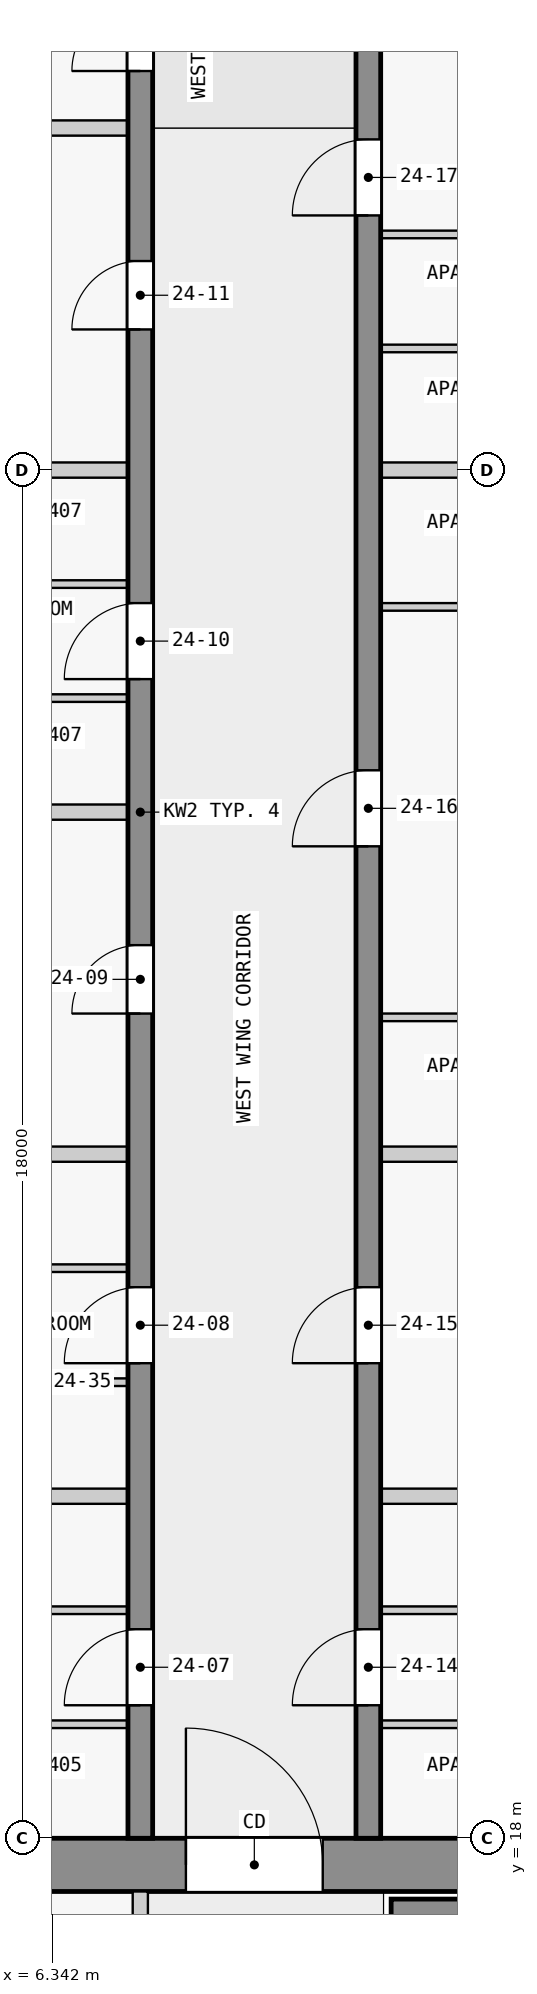
"""IFC4 building model, lengths in metres.
Left out: names, types, materials, properties, quantities, classifications, styles, units other than length and angle.
Written with IfcOpenShell. Run it as: python <this file> out.ifc"""

import sys

from ifc_helpers import new_model, si_unit, direction, frame, frame_2d, origin, place, context, subcontext, project, spatial, rectangle, extrude, element, fill, save


model = new_model("IFC4")
c1 = context("Model", 3, precision=1e-05, world=origin(), true_north=direction((0.0, 1.0)))
c2 = subcontext(c1, "Body", "Model", "MODEL_VIEW")
j1 = project(units=[si_unit("LENGTHUNIT", "METRE"), si_unit("PLANEANGLEUNIT", "RADIAN")], contexts=[c1])
p1 = place(None, origin())
s1 = spatial("IfcSite", under=j1, at=p1, CompositionType="ELEMENT")
p2 = place(p1, origin())
s2 = spatial("IfcBuilding", under=s1, at=p2, CompositionType="ELEMENT")
p3 = place(p2, frame((0.0, 0.0, 95.8)))
s3 = spatial("IfcBuildingStorey", under=s2, at=p3, CompositionType="ELEMENT", Elevation=95.8)
p4 = place(p3, frame((1.6, 17.65, 0.0), z_axis=(0.0, 0.0, 1.0), x_axis=(1.0, 0.0, 0.0)))
e1 = element("IfcWall", 1, at=p4, inside=s3, PredefinedType="SHEAR", context=c2, shape_type="SweptSolid", body=[
    extrude(rectangle(XDim=20.9, YDim=0.7, at=frame_2d((10.45, 0.0))), origin(), (0.0, 0.0, 1.0), 3.25),
])
p5 = place(p4, frame((6.5, 0.0, 0.0)))
e2 = element("IfcOpeningElement", 2, at=p5, cuts=e1, PredefinedType="OPENING", context=c2, shape_type="SweptSolid", body=[
    extrude(rectangle(XDim=1.8, YDim=2.1, at=frame_2d((0.9, 1.05))), frame((0.0, 0.36, 0.0), z_axis=(0.0, -1.0, 0.0), x_axis=(1.0, 0.0, 0.0)), (0.0, 0.0, 1.0), 0.72),
])
p6 = place(p3, frame((10.8, 17.05, 0.0), z_axis=(0.0, 0.0, 1.0), x_axis=(1.0, 0.0, 0.0)))
e3 = element("IfcWall", 3, at=p6, inside=s3, PredefinedType="SHEAR", context=c2, shape_type="SweptSolid", body=[
    extrude(rectangle(XDim=7.8, YDim=0.3, at=frame_2d((3.9, 0.0))), origin(), (0.0, 0.0, 1.0), 3.25),
])
p7 = place(p3, frame((7.5, 18.0, 0.0), z_axis=(0.0, 0.0, 1.0), x_axis=(0.0, 1.0, 0.0)))
e4 = element("IfcWall", 4, at=p7, inside=s3, PredefinedType="SHEAR", context=c2, shape_type="SweptSolid", body=[
    extrude(rectangle(XDim=27.0, YDim=0.325, at=frame_2d((13.5, 0.0))), origin(), (0.0, 0.0, 1.0), 3.25),
])
p8 = place(p7, frame((1.75, 0.0, 0.0)))
e5 = element("IfcOpeningElement", 5, at=p8, cuts=e4, PredefinedType="OPENING", context=c2, shape_type="SweptSolid", body=[
    extrude(rectangle(XDim=1.0, YDim=2.1, at=frame_2d((0.5, 1.05))), frame((0.0, 0.172, 0.0), z_axis=(0.0, -1.0, 0.0), x_axis=(1.0, 0.0, 0.0)), (0.0, 0.0, 1.0), 0.345),
])
p9 = place(p7, frame((6.25, 0.0, 0.0)))
e6 = element("IfcOpeningElement", 6, at=p9, cuts=e4, PredefinedType="OPENING", context=c2, shape_type="SweptSolid", body=[
    extrude(rectangle(XDim=1.0, YDim=2.1, at=frame_2d((0.5, 1.05))), frame((0.0, 0.172, 0.0), z_axis=(0.0, -1.0, 0.0), x_axis=(1.0, 0.0, 0.0)), (0.0, 0.0, 1.0), 0.345),
])
p10 = place(p7, frame((10.85, 0.0, 0.0)))
e7 = element("IfcOpeningElement", 7, at=p10, cuts=e4, PredefinedType="OPENING", context=c2, shape_type="SweptSolid", body=[
    extrude(rectangle(XDim=0.9, YDim=2.1, at=frame_2d((0.45, 1.05))), frame((0.0, 0.172, 0.0), z_axis=(0.0, -1.0, 0.0), x_axis=(1.0, 0.0, 0.0)), (0.0, 0.0, 1.0), 0.345),
])
p11 = place(p7, frame((15.25, 0.0, 0.0)))
e8 = element("IfcOpeningElement", 8, at=p11, cuts=e4, PredefinedType="OPENING", context=c2, shape_type="SweptSolid", body=[
    extrude(rectangle(XDim=1.0, YDim=2.1, at=frame_2d((0.5, 1.05))), frame((0.0, 0.172, 0.0), z_axis=(0.0, -1.0, 0.0), x_axis=(1.0, 0.0, 0.0)), (0.0, 0.0, 1.0), 0.345),
])
p12 = place(p7, frame((19.85, 0.0, 0.0)))
e9 = element("IfcOpeningElement", 9, at=p12, cuts=e4, PredefinedType="OPENING", context=c2, shape_type="SweptSolid", body=[
    extrude(rectangle(XDim=0.9, YDim=2.1, at=frame_2d((0.45, 1.05))), frame((0.0, 0.172, 0.0), z_axis=(0.0, -1.0, 0.0), x_axis=(1.0, 0.0, 0.0)), (0.0, 0.0, 1.0), 0.345),
])
p13 = place(p7, frame((23.25, 0.0, 0.0)))
e10 = element("IfcOpeningElement", 10, at=p13, cuts=e4, PredefinedType="OPENING", context=c2, shape_type="SweptSolid", body=[
    extrude(rectangle(XDim=0.9, YDim=2.1, at=frame_2d((0.45, 1.05))), frame((0.0, 0.172, 0.0), z_axis=(0.0, -1.0, 0.0), x_axis=(1.0, 0.0, 0.0)), (0.0, 0.0, 1.0), 0.345),
])
p14 = place(p7, frame((25.45, 0.0, 0.0)))
e11 = element("IfcOpeningElement", 11, at=p14, cuts=e4, PredefinedType="OPENING", context=c2, shape_type="SweptSolid", body=[
    extrude(rectangle(XDim=1.0, YDim=2.1, at=frame_2d((0.5, 1.05))), frame((0.0, 0.172, 0.0), z_axis=(0.0, -1.0, 0.0), x_axis=(1.0, 0.0, 0.0)), (0.0, 0.0, 1.0), 0.345),
])
p15 = place(p3, frame((10.5, 18.0, 0.0), z_axis=(0.0, 0.0, 1.0), x_axis=(0.0, 1.0, 0.0)))
e12 = element("IfcWall", 12, at=p15, inside=s3, PredefinedType="SHEAR", context=c2, shape_type="SweptSolid", body=[
    extrude(rectangle(XDim=27.0, YDim=0.325, at=frame_2d((13.5, 0.0))), origin(), (0.0, 0.0, 1.0), 3.25),
])
p16 = place(p15, frame((1.75, 0.0, 0.0)))
e13 = element("IfcOpeningElement", 13, at=p16, cuts=e12, PredefinedType="OPENING", context=c2, shape_type="SweptSolid", body=[
    extrude(rectangle(XDim=1.0, YDim=2.1, at=frame_2d((0.5, 1.05))), frame((0.0, 0.172, 0.0), z_axis=(0.0, -1.0, 0.0), x_axis=(1.0, 0.0, 0.0)), (0.0, 0.0, 1.0), 0.345),
])
p17 = place(p15, frame((6.25, 0.0, 0.0)))
e14 = element("IfcOpeningElement", 14, at=p17, cuts=e12, PredefinedType="OPENING", context=c2, shape_type="SweptSolid", body=[
    extrude(rectangle(XDim=1.0, YDim=2.1, at=frame_2d((0.5, 1.05))), frame((0.0, 0.172, 0.0), z_axis=(0.0, -1.0, 0.0), x_axis=(1.0, 0.0, 0.0)), (0.0, 0.0, 1.0), 0.345),
])
p18 = place(p15, frame((13.05, 0.0, 0.0)))
e15 = element("IfcOpeningElement", 15, at=p18, cuts=e12, PredefinedType="OPENING", context=c2, shape_type="SweptSolid", body=[
    extrude(rectangle(XDim=1.0, YDim=2.1, at=frame_2d((0.5, 1.05))), frame((0.0, 0.172, 0.0), z_axis=(0.0, -1.0, 0.0), x_axis=(1.0, 0.0, 0.0)), (0.0, 0.0, 1.0), 0.345),
])
p19 = place(p15, frame((21.35, 0.0, 0.0)))
e16 = element("IfcOpeningElement", 16, at=p19, cuts=e12, PredefinedType="OPENING", context=c2, shape_type="SweptSolid", body=[
    extrude(rectangle(XDim=1.0, YDim=2.1, at=frame_2d((0.5, 1.05))), frame((0.0, 0.172, 0.0), z_axis=(0.0, -1.0, 0.0), x_axis=(1.0, 0.0, 0.0)), (0.0, 0.0, 1.0), 0.345),
])
p20 = place(p3, frame((7.5, 10.1, 0.0), z_axis=(0.0, 0.0, 1.0), x_axis=(0.0, 1.0, 0.0)))
e17 = element("IfcWall", 17, at=p20, inside=s3, PredefinedType="PARTITIONING", context=c2, shape_type="SweptSolid", body=[
    extrude(rectangle(XDim=7.2, YDim=0.2, at=frame_2d((3.6, 0.0))), origin(), (0.0, 0.0, 1.0), 3.25),
])
p21 = place(p20, frame((1.05, 0.0, 0.0)))
e18 = element("IfcOpeningElement", 18, at=p21, cuts=e17, PredefinedType="OPENING", context=c2, shape_type="SweptSolid", body=[
    extrude(rectangle(XDim=0.9, YDim=2.1, at=frame_2d((0.45, 1.05))), frame((0.0, 0.11, 0.0), z_axis=(0.0, -1.0, 0.0), x_axis=(1.0, 0.0, 0.0)), (0.0, 0.0, 1.0), 0.22),
])
p22 = place(p20, frame((4.65, 0.0, 0.0)))
e19 = element("IfcOpeningElement", 19, at=p22, cuts=e17, PredefinedType="OPENING", context=c2, shape_type="SweptSolid", body=[
    extrude(rectangle(XDim=0.9, YDim=2.1, at=frame_2d((0.45, 1.05))), frame((0.0, 0.11, 0.0), z_axis=(0.0, -1.0, 0.0), x_axis=(1.0, 0.0, 0.0)), (0.0, 0.0, 1.0), 0.22),
])
p23 = place(p3, frame((7.337, 19.5, 0.0), z_axis=(0.0, 0.0, 1.0), x_axis=(-1.0, 0.0, 0.0)))
e20 = element("IfcWall", 20, at=p23, inside=s3, PredefinedType="PARTITIONING", context=c2, shape_type="SweptSolid", body=[
    extrude(rectangle(XDim=3.4, YDim=0.1, at=frame_2d((1.7, 0.0))), origin(), (0.0, 0.0, 1.0), 3.25),
])
p24 = place(p23, frame((1.25, 0.0, 0.0)))
e21 = element("IfcOpeningElement", 21, at=p24, cuts=e20, PredefinedType="OPENING", context=c2, shape_type="SweptSolid", body=[
    extrude(rectangle(XDim=0.9, YDim=2.1, at=frame_2d((0.45, 1.05))), frame((0.0, 0.06, 0.0), z_axis=(0.0, -1.0, 0.0), x_axis=(1.0, 0.0, 0.0)), (0.0, 0.0, 1.0), 0.12),
])
p25 = place(p3, frame((14.062, 19.5, 0.0), z_axis=(0.0, 0.0, 1.0), x_axis=(-1.0, 0.0, 0.0)))
e22 = element("IfcWall", 22, at=p25, inside=s3, PredefinedType="PARTITIONING", context=c2, shape_type="SweptSolid", body=[
    extrude(rectangle(XDim=3.4, YDim=0.1, at=frame_2d((1.7, 0.0))), origin(), (0.0, 0.0, 1.0), 3.25),
])
p26 = place(p25, frame((1.25, 0.0, 0.0)))
e23 = element("IfcOpeningElement", 23, at=p26, cuts=e22, PredefinedType="OPENING", context=c2, shape_type="SweptSolid", body=[
    extrude(rectangle(XDim=0.9, YDim=2.1, at=frame_2d((0.45, 1.05))), frame((0.0, 0.06, 0.0), z_axis=(0.0, -1.0, 0.0), x_axis=(1.0, 0.0, 0.0)), (0.0, 0.0, 1.0), 0.12),
])
p27 = place(p3, frame((3.938, 21.0, 0.0), z_axis=(0.0, 0.0, 1.0), x_axis=(1.0, 0.0, 0.0)))
e24 = element("IfcWall", 24, at=p27, inside=s3, PredefinedType="PARTITIONING", context=c2, shape_type="SweptSolid", body=[
    extrude(rectangle(XDim=3.4, YDim=0.1, at=frame_2d((1.7, 0.0))), origin(), (0.0, 0.0, 1.0), 3.25),
])
p28 = place(p27, frame((1.25, 0.0, 0.0)))
e25 = element("IfcOpeningElement", 25, at=p28, cuts=e24, PredefinedType="OPENING", context=c2, shape_type="SweptSolid", body=[
    extrude(rectangle(XDim=0.9, YDim=2.1, at=frame_2d((0.45, 1.05))), frame((0.0, 0.06, 0.0), z_axis=(0.0, -1.0, 0.0), x_axis=(1.0, 0.0, 0.0)), (0.0, 0.0, 1.0), 0.12),
])
p29 = place(p3, frame((10.663, 21.0, 0.0), z_axis=(0.0, 0.0, 1.0), x_axis=(1.0, 0.0, 0.0)))
e26 = element("IfcWall", 26, at=p29, inside=s3, PredefinedType="PARTITIONING", context=c2, shape_type="SweptSolid", body=[
    extrude(rectangle(XDim=3.4, YDim=0.1, at=frame_2d((1.7, 0.0))), origin(), (0.0, 0.0, 1.0), 3.25),
])
p30 = place(p29, frame((1.25, 0.0, 0.0)))
e27 = element("IfcOpeningElement", 27, at=p30, cuts=e26, PredefinedType="OPENING", context=c2, shape_type="SweptSolid", body=[
    extrude(rectangle(XDim=0.9, YDim=2.1, at=frame_2d((0.45, 1.05))), frame((0.0, 0.06, 0.0), z_axis=(0.0, -1.0, 0.0), x_axis=(1.0, 0.0, 0.0)), (0.0, 0.0, 1.0), 0.12),
])
for number, where, z_axis, x_axis in (
    (28, (7.337, 22.5, 0.0), (0.0, 0.0, 1.0), (-1.0, 0.0, 0.0)),
    (29, (13.962, 22.5, 0.0), (0.0, 0.0, 1.0), (-1.0, 0.0, 0.0)),
):
    element("IfcWall", number, at=place(p3, frame(where, z_axis=z_axis, x_axis=x_axis)), inside=s3, PredefinedType="PARTITIONING", context=c2, shape_type="SweptSolid", body=[
        extrude(rectangle(XDim=3.3, YDim=0.2, at=frame_2d((1.65, 0.0))), origin(), (0.0, 0.0, 1.0), 3.25),
    ])
p31 = place(p3, frame((7.337, 24.0, 0.0), z_axis=(0.0, 0.0, 1.0), x_axis=(-1.0, 0.0, 0.0)))
e30 = element("IfcWall", 30, at=p31, inside=s3, PredefinedType="PARTITIONING", context=c2, shape_type="SweptSolid", body=[
    extrude(rectangle(XDim=3.4, YDim=0.1, at=frame_2d((1.7, 0.0))), origin(), (0.0, 0.0, 1.0), 3.25),
])
p32 = place(p31, frame((1.25, 0.0, 0.0)))
e31 = element("IfcOpeningElement", 31, at=p32, cuts=e30, PredefinedType="OPENING", context=c2, shape_type="SweptSolid", body=[
    extrude(rectangle(XDim=0.9, YDim=2.1, at=frame_2d((0.45, 1.05))), frame((0.0, 0.06, 0.0), z_axis=(0.0, -1.0, 0.0), x_axis=(1.0, 0.0, 0.0)), (0.0, 0.0, 1.0), 0.12),
])
p33 = place(p3, frame((3.938, 25.5, 0.0), z_axis=(0.0, 0.0, 1.0), x_axis=(1.0, 0.0, 0.0)))
e32 = element("IfcWall", 32, at=p33, inside=s3, PredefinedType="PARTITIONING", context=c2, shape_type="SweptSolid", body=[
    extrude(rectangle(XDim=3.4, YDim=0.1, at=frame_2d((1.7, 0.0))), origin(), (0.0, 0.0, 1.0), 3.25),
])
p34 = place(p33, frame((1.25, 0.0, 0.0)))
e33 = element("IfcOpeningElement", 33, at=p34, cuts=e32, PredefinedType="OPENING", context=c2, shape_type="SweptSolid", body=[
    extrude(rectangle(XDim=0.9, YDim=2.1, at=frame_2d((0.45, 1.05))), frame((0.0, 0.06, 0.0), z_axis=(0.0, -1.0, 0.0), x_axis=(1.0, 0.0, 0.0)), (0.0, 0.0, 1.0), 0.12),
])
p35 = place(p3, frame((7.337, 27.0, 0.0), z_axis=(0.0, 0.0, 1.0), x_axis=(-1.0, 0.0, 0.0)))
e34 = element("IfcWall", 34, at=p35, inside=s3, PredefinedType="PARTITIONING", context=c2, shape_type="SweptSolid", body=[
    extrude(rectangle(XDim=3.3, YDim=0.2, at=frame_2d((1.65, 0.0))), origin(), (0.0, 0.0, 1.0), 3.25),
])
p36 = place(p3, frame((18.08, 27.0, 0.0), z_axis=(0.0, 0.0, 1.0), x_axis=(-1.0, 0.0, 0.0)))
e35 = element("IfcWall", 35, at=p36, inside=s3, PredefinedType="PARTITIONING", context=c2, shape_type="SweptSolid", body=[
    extrude(rectangle(XDim=7.417, YDim=0.2, at=frame_2d((3.709, 0.0))), origin(), (0.0, 0.0, 1.0), 3.25),
])
p37 = place(p3, frame((14.062, 28.8, 0.0), z_axis=(0.0, 0.0, 1.0), x_axis=(-1.0, 0.0, 0.0)))
e36 = element("IfcWall", 36, at=p37, inside=s3, PredefinedType="PARTITIONING", context=c2, shape_type="SweptSolid", body=[
    extrude(rectangle(XDim=3.4, YDim=0.1, at=frame_2d((1.7, 0.0))), origin(), (0.0, 0.0, 1.0), 3.25),
])
p38 = place(p37, frame((1.25, 0.0, 0.0)))
e37 = element("IfcOpeningElement", 37, at=p38, cuts=e36, PredefinedType="OPENING", context=c2, shape_type="SweptSolid", body=[
    extrude(rectangle(XDim=0.9, YDim=2.1, at=frame_2d((0.45, 1.05))), frame((0.0, 0.06, 0.0), z_axis=(0.0, -1.0, 0.0), x_axis=(1.0, 0.0, 0.0)), (0.0, 0.0, 1.0), 0.12),
])
p39 = place(p3, frame((7.337, 31.5, 0.0), z_axis=(0.0, 0.0, 1.0), x_axis=(-1.0, 0.0, 0.0)))
e38 = element("IfcWall", 38, at=p39, inside=s3, PredefinedType="PARTITIONING", context=c2, shape_type="SweptSolid", body=[
    extrude(rectangle(XDim=7.188, YDim=0.2, at=frame_2d((3.594, 0.0))), origin(), (0.0, 0.0, 1.0), 3.25),
])
p40 = place(p3, frame((7.337, 33.0, 0.0), z_axis=(0.0, 0.0, 1.0), x_axis=(-1.0, 0.0, 0.0)))
e39 = element("IfcWall", 39, at=p40, inside=s3, PredefinedType="PARTITIONING", context=c2, shape_type="SweptSolid", body=[
    extrude(rectangle(XDim=3.4, YDim=0.1, at=frame_2d((1.7, 0.0))), origin(), (0.0, 0.0, 1.0), 3.25),
])
p41 = place(p40, frame((1.25, 0.0, 0.0)))
e40 = element("IfcOpeningElement", 40, at=p41, cuts=e39, PredefinedType="OPENING", context=c2, shape_type="SweptSolid", body=[
    extrude(rectangle(XDim=0.9, YDim=2.1, at=frame_2d((0.45, 1.05))), frame((0.0, 0.06, 0.0), z_axis=(0.0, -1.0, 0.0), x_axis=(1.0, 0.0, 0.0)), (0.0, 0.0, 1.0), 0.12),
])
p42 = place(p3, frame((10.663, 34.2, 0.0), z_axis=(0.0, 0.0, 1.0), x_axis=(1.0, 0.0, 0.0)))
e41 = element("IfcWall", 41, at=p42, inside=s3, PredefinedType="PARTITIONING", context=c2, shape_type="SweptSolid", body=[
    extrude(rectangle(XDim=3.35, YDim=0.1, at=frame_2d((1.675, 0.0))), origin(), (0.0, 0.0, 1.0), 3.25),
])
p43 = place(p42, frame((1.25, 0.0, 0.0)))
e42 = element("IfcOpeningElement", 42, at=p43, cuts=e41, PredefinedType="OPENING", context=c2, shape_type="SweptSolid", body=[
    extrude(rectangle(XDim=0.9, YDim=2.1, at=frame_2d((0.45, 1.05))), frame((0.0, 0.06, 0.0), z_axis=(0.0, -1.0, 0.0), x_axis=(1.0, 0.0, 0.0)), (0.0, 0.0, 1.0), 0.12),
])
p44 = place(p3, frame((3.938, 34.5, 0.0), z_axis=(0.0, 0.0, 1.0), x_axis=(1.0, 0.0, 0.0)))
e43 = element("IfcWall", 43, at=p44, inside=s3, PredefinedType="PARTITIONING", context=c2, shape_type="SweptSolid", body=[
    extrude(rectangle(XDim=3.4, YDim=0.1, at=frame_2d((1.7, 0.0))), origin(), (0.0, 0.0, 1.0), 3.25),
])
p45 = place(p44, frame((1.25, 0.0, 0.0)))
e44 = element("IfcOpeningElement", 44, at=p45, cuts=e43, PredefinedType="OPENING", context=c2, shape_type="SweptSolid", body=[
    extrude(rectangle(XDim=0.9, YDim=2.1, at=frame_2d((0.45, 1.05))), frame((0.0, 0.06, 0.0), z_axis=(0.0, -1.0, 0.0), x_axis=(1.0, 0.0, 0.0)), (0.0, 0.0, 1.0), 0.12),
])
for number, where, z_axis, x_axis in (
    (45, (7.337, 36.0, 0.0), (0.0, 0.0, 1.0), (-1.0, 0.0, 0.0)),
    (46, (14.062, 36.0, 0.0), (0.0, 0.0, 1.0), (-1.0, 0.0, 0.0)),
):
    element("IfcWall", number, at=place(p3, frame(where, z_axis=z_axis, x_axis=x_axis)), inside=s3, PredefinedType="PARTITIONING", context=c2, shape_type="SweptSolid", body=[
        extrude(rectangle(XDim=3.4, YDim=0.2, at=frame_2d((1.7, 0.0))), origin(), (0.0, 0.0, 1.0), 3.25),
    ])
p46 = place(p3, frame((14.012, 37.6, 0.0), z_axis=(0.0, 0.0, 1.0), x_axis=(-1.0, 0.0, 0.0)))
e47 = element("IfcWall", 47, at=p46, inside=s3, PredefinedType="PARTITIONING", context=c2, shape_type="SweptSolid", body=[
    extrude(rectangle(XDim=3.35, YDim=0.1, at=frame_2d((1.675, 0.0))), origin(), (0.0, 0.0, 1.0), 3.25),
])
p47 = place(p3, frame((14.012, 39.1, 0.0), z_axis=(0.0, 0.0, 1.0), x_axis=(-1.0, 0.0, 0.0)))
e48 = element("IfcWall", 48, at=p47, inside=s3, PredefinedType="PARTITIONING", context=c2, shape_type="SweptSolid", body=[
    extrude(rectangle(XDim=3.35, YDim=0.1, at=frame_2d((1.675, 0.0))), origin(), (0.0, 0.0, 1.0), 3.25),
])
p48 = place(p47, frame((1.25, 0.0, 0.0)))
e49 = element("IfcOpeningElement", 49, at=p48, cuts=e48, PredefinedType="OPENING", context=c2, shape_type="SweptSolid", body=[
    extrude(rectangle(XDim=0.9, YDim=2.1, at=frame_2d((0.45, 1.05))), frame((0.0, 0.06, 0.0), z_axis=(0.0, -1.0, 0.0), x_axis=(1.0, 0.0, 0.0)), (0.0, 0.0, 1.0), 0.12),
])
p49 = place(p3, frame((7.337, 40.5, 0.0), z_axis=(0.0, 0.0, 1.0), x_axis=(-1.0, 0.0, 0.0)))
e50 = element("IfcWall", 50, at=p49, inside=s3, PredefinedType="PARTITIONING", context=c2, shape_type="SweptSolid", body=[
    extrude(rectangle(XDim=7.417, YDim=0.2, at=frame_2d((3.709, 0.0))), origin(), (0.0, 0.0, 1.0), 3.25),
])
p50 = place(p5, origin())
e51 = element("IfcDoor", 51, at=p50, inside=s3, OperationType="DOUBLE_DOOR_SINGLE_SWING", PredefinedType="DOOR", context=c2, shape_type="SweptSolid", body=[
    extrude(rectangle(XDim=1.8, YDim=2.1, at=frame_2d((0.9, 1.05))), frame((0.0, 0.025, 0.0), z_axis=(0.0, -1.0, 0.0), x_axis=(1.0, 0.0, 0.0)), (0.0, 0.0, 1.0), 0.05),
])
fill(e2, e51)
p51 = place(p8, origin())
e52 = element("IfcDoor", 52, at=p51, inside=s3, OperationType="SINGLE_SWING_LEFT", PredefinedType="DOOR", context=c2, shape_type="SweptSolid", body=[
    extrude(rectangle(XDim=1.0, YDim=2.1, at=frame_2d((0.5, 1.05))), frame((0.0, 0.025, 0.0), z_axis=(0.0, -1.0, 0.0), x_axis=(1.0, 0.0, 0.0)), (0.0, 0.0, 1.0), 0.05),
])
fill(e5, e52)
p52 = place(p9, origin())
e53 = element("IfcDoor", 53, at=p52, inside=s3, OperationType="SINGLE_SWING_LEFT", PredefinedType="DOOR", context=c2, shape_type="SweptSolid", body=[
    extrude(rectangle(XDim=1.0, YDim=2.1, at=frame_2d((0.5, 1.05))), frame((0.0, 0.025, 0.0), z_axis=(0.0, -1.0, 0.0), x_axis=(1.0, 0.0, 0.0)), (0.0, 0.0, 1.0), 0.05),
])
fill(e6, e53)
p53 = place(p10, origin())
e54 = element("IfcDoor", 54, at=p53, inside=s3, OperationType="SINGLE_SWING_LEFT", PredefinedType="DOOR", context=c2, shape_type="SweptSolid", body=[
    extrude(rectangle(XDim=0.9, YDim=2.1, at=frame_2d((0.45, 1.05))), frame((0.0, 0.025, 0.0), z_axis=(0.0, -1.0, 0.0), x_axis=(1.0, 0.0, 0.0)), (0.0, 0.0, 1.0), 0.05),
])
fill(e7, e54)
p54 = place(p11, origin())
e55 = element("IfcDoor", 55, at=p54, inside=s3, OperationType="SINGLE_SWING_RIGHT", PredefinedType="DOOR", context=c2, shape_type="SweptSolid", body=[
    extrude(rectangle(XDim=1.0, YDim=2.1, at=frame_2d((0.5, 1.05))), frame((0.0, 0.025, 0.0), z_axis=(0.0, -1.0, 0.0), x_axis=(1.0, 0.0, 0.0)), (0.0, 0.0, 1.0), 0.05),
])
fill(e8, e55)
p55 = place(p12, origin())
e56 = element("IfcDoor", 56, at=p55, inside=s3, OperationType="SINGLE_SWING_RIGHT", PredefinedType="DOOR", context=c2, shape_type="SweptSolid", body=[
    extrude(rectangle(XDim=0.9, YDim=2.1, at=frame_2d((0.45, 1.05))), frame((0.0, 0.025, 0.0), z_axis=(0.0, -1.0, 0.0), x_axis=(1.0, 0.0, 0.0)), (0.0, 0.0, 1.0), 0.05),
])
fill(e9, e56)
p56 = place(p13, origin())
e57 = element("IfcDoor", 57, at=p56, inside=s3, OperationType="SINGLE_SWING_RIGHT", PredefinedType="DOOR", context=c2, shape_type="SweptSolid", body=[
    extrude(rectangle(XDim=0.9, YDim=2.1, at=frame_2d((0.45, 1.05))), frame((0.0, 0.025, 0.0), z_axis=(0.0, -1.0, 0.0), x_axis=(1.0, 0.0, 0.0)), (0.0, 0.0, 1.0), 0.05),
])
fill(e10, e57)
p57 = place(p16, origin())
e58 = element("IfcDoor", 58, at=p57, inside=s3, OperationType="SINGLE_SWING_LEFT", PredefinedType="DOOR", context=c2, shape_type="SweptSolid", body=[
    extrude(rectangle(XDim=1.0, YDim=2.1, at=frame_2d((0.5, 1.05))), frame((0.0, 0.025, 0.0), z_axis=(0.0, -1.0, 0.0), x_axis=(1.0, 0.0, 0.0)), (0.0, 0.0, 1.0), 0.05),
])
fill(e13, e58)
p58 = place(p17, origin())
e59 = element("IfcDoor", 59, at=p58, inside=s3, OperationType="SINGLE_SWING_LEFT", PredefinedType="DOOR", context=c2, shape_type="SweptSolid", body=[
    extrude(rectangle(XDim=1.0, YDim=2.1, at=frame_2d((0.5, 1.05))), frame((0.0, 0.025, 0.0), z_axis=(0.0, -1.0, 0.0), x_axis=(1.0, 0.0, 0.0)), (0.0, 0.0, 1.0), 0.05),
])
fill(e14, e59)
p59 = place(p18, origin())
e60 = element("IfcDoor", 60, at=p59, inside=s3, OperationType="SINGLE_SWING_RIGHT", PredefinedType="DOOR", context=c2, shape_type="SweptSolid", body=[
    extrude(rectangle(XDim=1.0, YDim=2.1, at=frame_2d((0.5, 1.05))), frame((0.0, 0.025, 0.0), z_axis=(0.0, -1.0, 0.0), x_axis=(1.0, 0.0, 0.0)), (0.0, 0.0, 1.0), 0.05),
])
fill(e15, e60)
p60 = place(p19, origin())
e61 = element("IfcDoor", 61, at=p60, inside=s3, OperationType="SINGLE_SWING_RIGHT", PredefinedType="DOOR", context=c2, shape_type="SweptSolid", body=[
    extrude(rectangle(XDim=1.0, YDim=2.1, at=frame_2d((0.5, 1.05))), frame((0.0, 0.025, 0.0), z_axis=(0.0, -1.0, 0.0), x_axis=(1.0, 0.0, 0.0)), (0.0, 0.0, 1.0), 0.05),
])
fill(e16, e61)
save(model, sys.argv[1])
